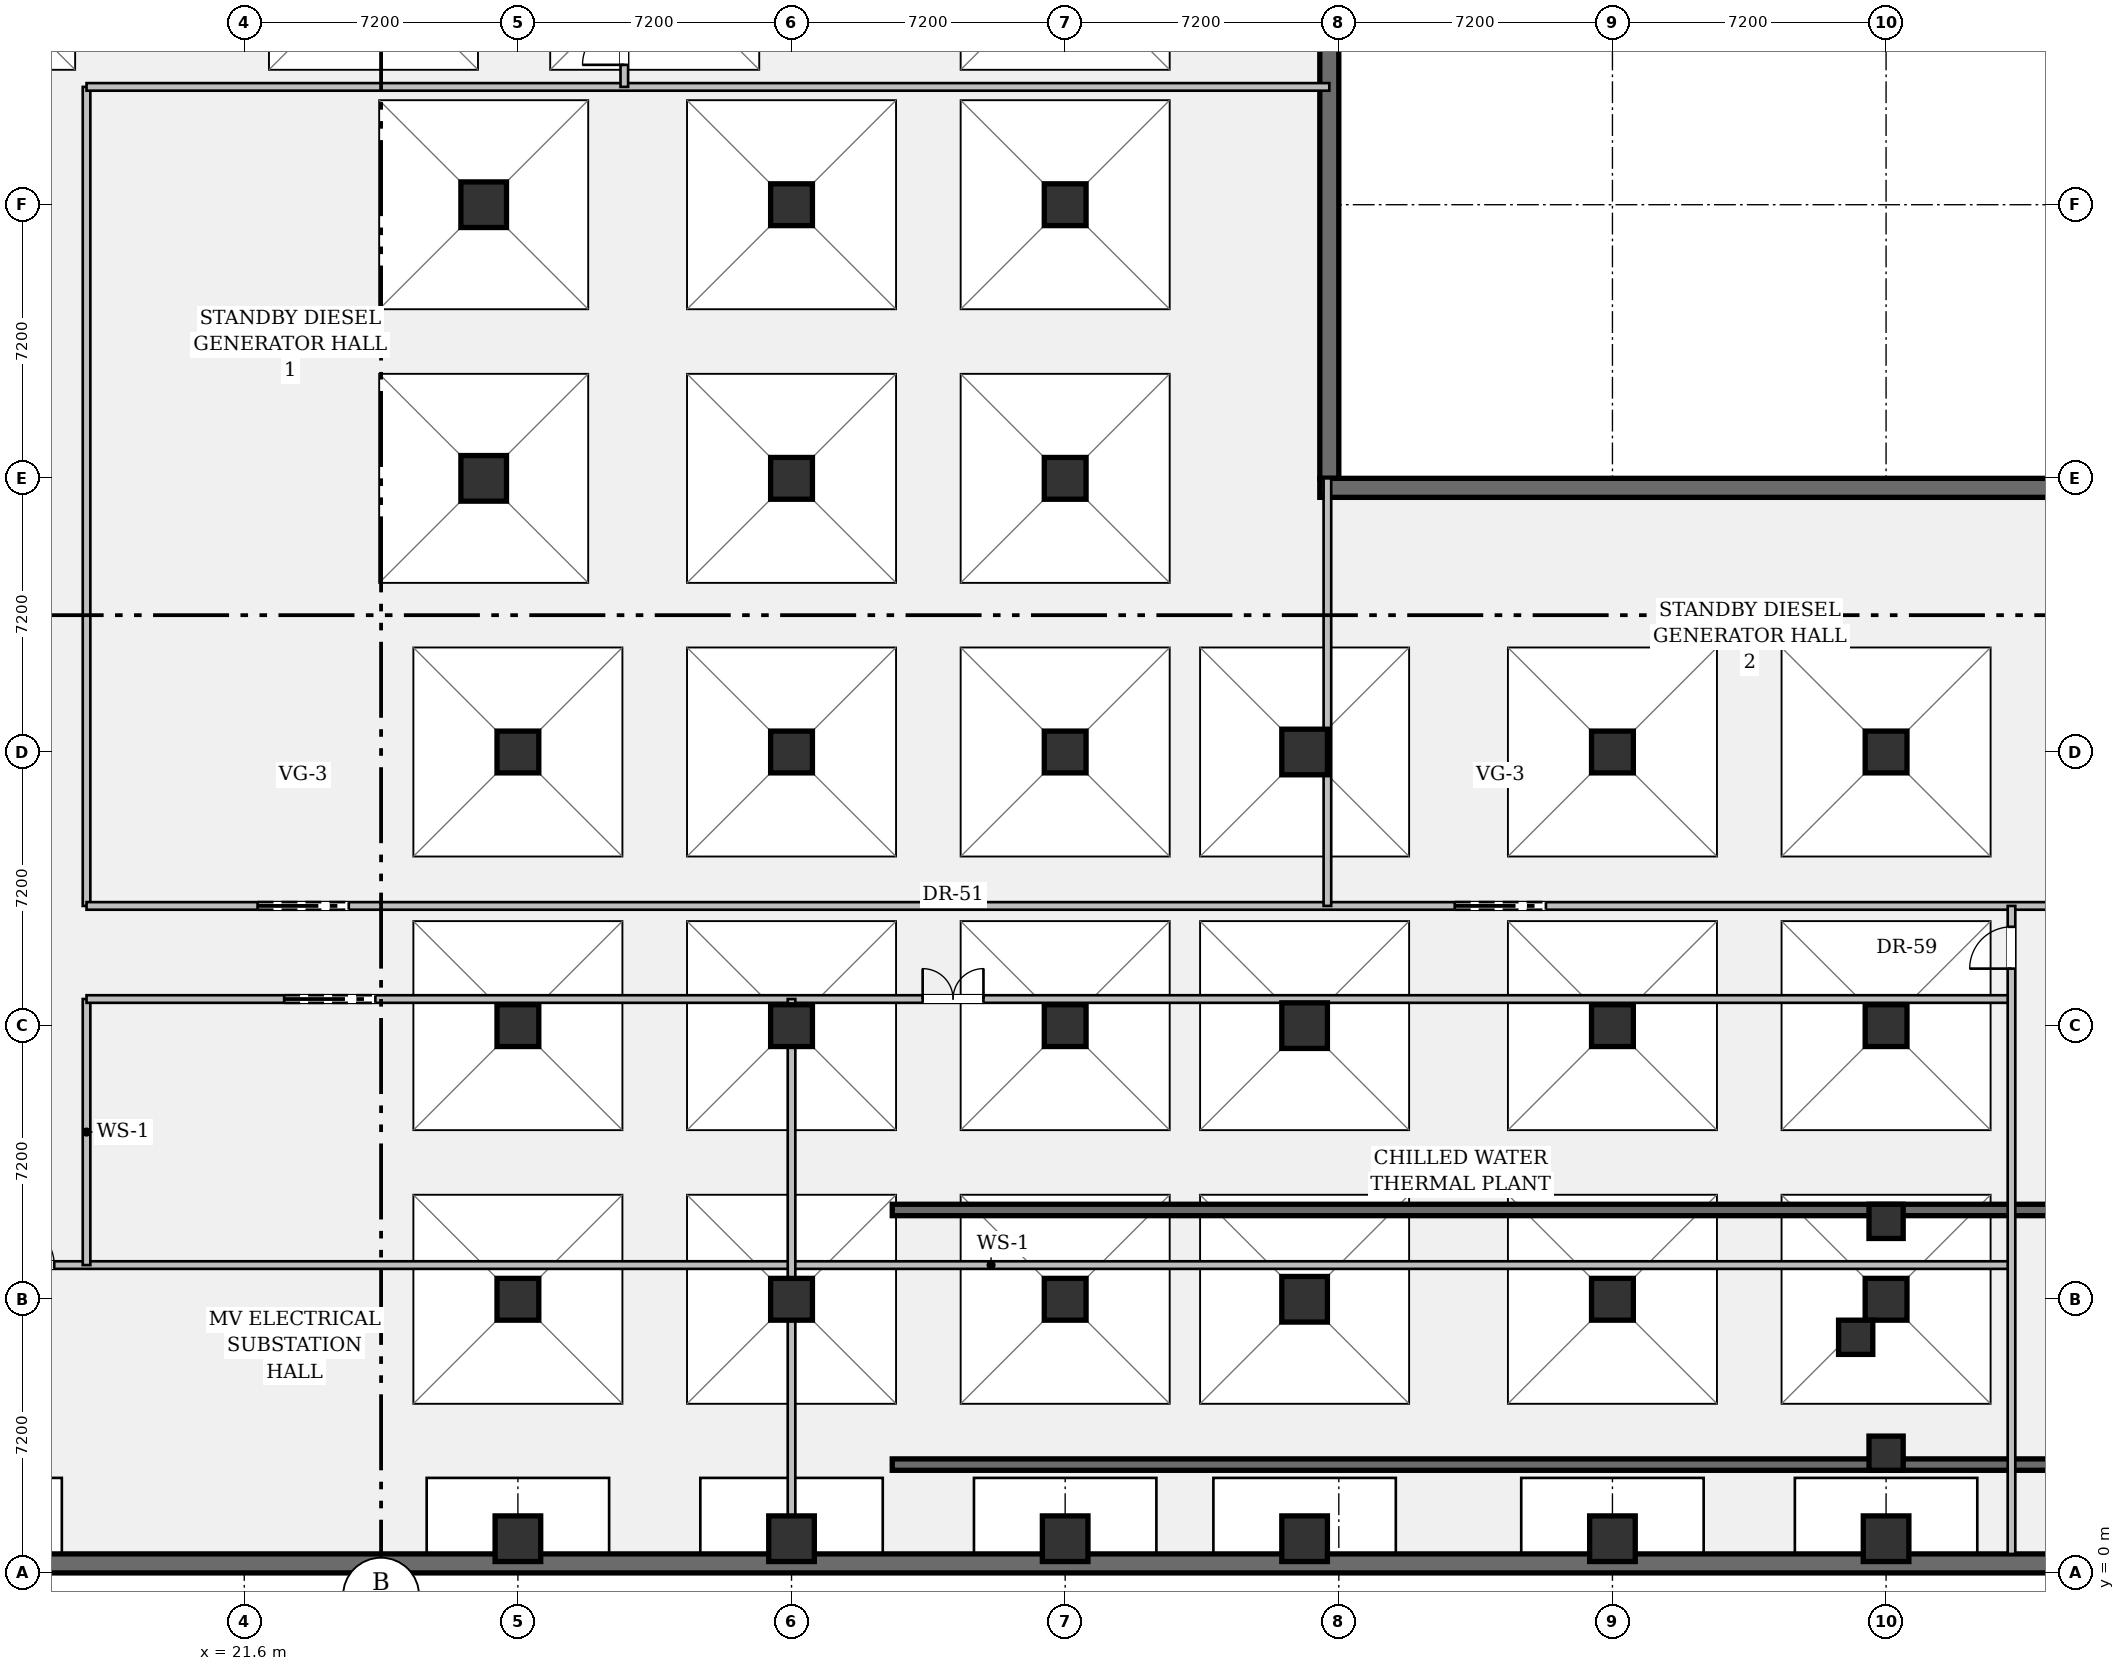
"""IFC4 building model, lengths in metres.
Left out: names, types, materials, properties, quantities, classifications, styles, units other than length and angle.
Written with IfcOpenShell. Run it as: python <this file> out.ifc"""

import sys

from ifc_helpers import new_model, si_unit, direction, frame, frame_2d, origin, origin_2d, place, context, subcontext, project, spatial, rectangle, hollow_rectangle, extrude, element, fill, save


model = new_model("IFC4")
c1 = context("Model", 3, precision=1e-05, world=origin(), true_north=direction((0.0, 1.0)))
c2 = subcontext(c1, "Body", "Model", "MODEL_VIEW")
j1 = project(units=[si_unit("LENGTHUNIT", "METRE"), si_unit("PLANEANGLEUNIT", "RADIAN")], contexts=[c1])
p1 = place(None, origin())
s1 = spatial("IfcSite", under=j1, at=p1, CompositionType="ELEMENT")
p2 = place(p1, origin())
s2 = spatial("IfcBuilding", under=s1, at=p2, CompositionType="ELEMENT")
p3 = place(p2, frame((0.0, 0.0, -9.1)))
s3 = spatial("IfcBuildingStorey", under=s2, at=p3, CompositionType="ELEMENT", Elevation=-9.1)
p4 = place(p3, frame((50.15, 47.2, 0.0), z_axis=(0.0, 0.0, 1.0), x_axis=(0.0, -1.0, 0.0)))
e1 = element("IfcWall", 1, at=p4, inside=s3, PredefinedType="SOLIDWALL", context=c2, shape_type="SweptSolid", body=[
    extrude(rectangle(XDim=18.4, YDim=0.5, at=frame_2d((9.2, 0.0))), origin(), (0.0, 0.0, 1.0), 4.25),
])
p5 = place(p3, frame((49.9, 28.55, 0.0), z_axis=(0.0, 0.0, 1.0), x_axis=(1.0, 0.0, 0.0)))
e2 = element("IfcWall", 2, at=p5, inside=s3, PredefinedType="SOLIDWALL", context=c2, shape_type="SweptSolid", body=[
    extrude(rectangle(XDim=33.8, YDim=0.5, at=frame_2d((16.9, 0.0))), origin(), (0.0, 0.0, 1.0), 4.25),
])
p6 = place(p3, frame((83.7, 0.25, 0.0), z_axis=(0.0, 0.0, 1.0), x_axis=(-1.0, 0.0, 0.0)))
e3 = element("IfcWall", 3, at=p6, inside=s3, PredefinedType="SOLIDWALL", context=c2, shape_type="SweptSolid", body=[
    extrude(rectangle(XDim=81.0, YDim=0.5, at=frame_2d((40.5, 0.0))), origin(), (0.0, 0.0, 1.0), 4.25),
])
for number, where, z_axis, x_axis in (
    (4, (27.9, 28.8, 0.0), (0.0, 0.0, 1.0), (1.0, 0.0, 0.0)),
    (5, (27.9, 36.0, 0.0), (0.0, 0.0, 1.0), (1.0, 0.0, 0.0)),
    (6, (28.8, 0.9, 0.0), (0.0, 0.0, 1.0), (1.0, 0.0, 0.0)),
):
    element("IfcColumn", number, at=place(p3, frame(where, z_axis=z_axis, x_axis=x_axis)), inside=s3, PredefinedType="COLUMN", context=c2, shape_type="SweptSolid", body=[
        extrude(hollow_rectangle(XDim=1.2, YDim=1.2, WallThickness=0.075, at=origin_2d()), origin(), (0.0, 0.0, 1.0), 4.25),
    ])
for number, where, z_axis, x_axis in (
    (7, (28.8, 7.2, 0.0), (0.0, 0.0, 1.0), (1.0, 0.0, 0.0)),
    (8, (28.8, 14.4, 0.0), (0.0, 0.0, 1.0), (1.0, 0.0, 0.0)),
    (9, (28.8, 21.6, 0.0), (0.0, 0.0, 1.0), (1.0, 0.0, 0.0)),
):
    element("IfcColumn", number, at=place(p3, frame(where, z_axis=z_axis, x_axis=x_axis)), inside=s3, PredefinedType="COLUMN", context=c2, shape_type="SweptSolid", body=[
        extrude(rectangle(XDim=1.1, YDim=1.1, at=origin_2d()), origin(), (0.0, 0.0, 1.0), 4.25),
    ])
p7 = place(p3, frame((36.0, 0.9, 0.0), z_axis=(0.0, 0.0, 1.0), x_axis=(1.0, 0.0, 0.0)))
e10 = element("IfcColumn", 10, at=p7, inside=s3, PredefinedType="COLUMN", context=c2, shape_type="SweptSolid", body=[
    extrude(hollow_rectangle(XDim=1.2, YDim=1.2, WallThickness=0.075, at=origin_2d()), origin(), (0.0, 0.0, 1.0), 4.25),
])
for number, where, z_axis, x_axis in (
    (11, (36.0, 7.2, 0.0), (0.0, 0.0, 1.0), (1.0, 0.0, 0.0)),
    (12, (36.0, 14.4, 0.0), (0.0, 0.0, 1.0), (1.0, 0.0, 0.0)),
    (13, (36.0, 21.6, 0.0), (0.0, 0.0, 1.0), (1.0, 0.0, 0.0)),
    (14, (36.0, 28.8, 0.0), (0.0, 0.0, 1.0), (1.0, 0.0, 0.0)),
    (15, (36.0, 36.0, 0.0), (0.0, 0.0, 1.0), (1.0, 0.0, 0.0)),
):
    element("IfcColumn", number, at=place(p3, frame(where, z_axis=z_axis, x_axis=x_axis)), inside=s3, PredefinedType="COLUMN", context=c2, shape_type="SweptSolid", body=[
        extrude(rectangle(XDim=1.1, YDim=1.1, at=origin_2d()), origin(), (0.0, 0.0, 1.0), 4.25),
    ])
p8 = place(p3, frame((43.2, 0.9, 0.0), z_axis=(0.0, 0.0, 1.0), x_axis=(1.0, 0.0, 0.0)))
e16 = element("IfcColumn", 16, at=p8, inside=s3, PredefinedType="COLUMN", context=c2, shape_type="SweptSolid", body=[
    extrude(hollow_rectangle(XDim=1.2, YDim=1.2, WallThickness=0.075, at=origin_2d()), origin(), (0.0, 0.0, 1.0), 4.25),
])
for number, where, z_axis, x_axis in (
    (17, (43.2, 7.2, 0.0), (0.0, 0.0, 1.0), (1.0, 0.0, 0.0)),
    (18, (43.2, 14.4, 0.0), (0.0, 0.0, 1.0), (1.0, 0.0, 0.0)),
    (19, (43.2, 21.6, 0.0), (0.0, 0.0, 1.0), (1.0, 0.0, 0.0)),
    (20, (43.2, 28.8, 0.0), (0.0, 0.0, 1.0), (1.0, 0.0, 0.0)),
    (21, (43.2, 36.0, 0.0), (0.0, 0.0, 1.0), (1.0, 0.0, 0.0)),
):
    element("IfcColumn", number, at=place(p3, frame(where, z_axis=z_axis, x_axis=x_axis)), inside=s3, PredefinedType="COLUMN", context=c2, shape_type="SweptSolid", body=[
        extrude(rectangle(XDim=1.1, YDim=1.1, at=origin_2d()), origin(), (0.0, 0.0, 1.0), 4.25),
    ])
for number, where, z_axis, x_axis in (
    (22, (49.5, 0.9, 0.0), (0.0, 0.0, 1.0), (1.0, 0.0, 0.0)),
    (23, (49.5, 7.2, 0.0), (0.0, 0.0, 1.0), (1.0, 0.0, 0.0)),
    (24, (49.5, 14.4, 0.0), (0.0, 0.0, 1.0), (1.0, 0.0, 0.0)),
    (25, (49.5, 21.6, 0.0), (0.0, 0.0, 1.0), (1.0, 0.0, 0.0)),
    (26, (57.6, 0.9, 0.0), (0.0, 0.0, 1.0), (1.0, 0.0, 0.0)),
):
    element("IfcColumn", number, at=place(p3, frame(where, z_axis=z_axis, x_axis=x_axis)), inside=s3, PredefinedType="COLUMN", context=c2, shape_type="SweptSolid", body=[
        extrude(hollow_rectangle(XDim=1.2, YDim=1.2, WallThickness=0.075, at=origin_2d()), origin(), (0.0, 0.0, 1.0), 4.25),
    ])
for number, where, z_axis, x_axis in (
    (27, (57.6, 7.2, 0.0), (0.0, 0.0, 1.0), (1.0, 0.0, 0.0)),
    (28, (57.6, 14.4, 0.0), (0.0, 0.0, 1.0), (1.0, 0.0, 0.0)),
    (29, (57.6, 21.6, 0.0), (0.0, 0.0, 1.0), (1.0, 0.0, 0.0)),
):
    element("IfcColumn", number, at=place(p3, frame(where, z_axis=z_axis, x_axis=x_axis)), inside=s3, PredefinedType="COLUMN", context=c2, shape_type="SweptSolid", body=[
        extrude(rectangle(XDim=1.1, YDim=1.1, at=origin_2d()), origin(), (0.0, 0.0, 1.0), 4.25),
    ])
p9 = place(p3, frame((64.8, 0.9, 0.0), z_axis=(0.0, 0.0, 1.0), x_axis=(1.0, 0.0, 0.0)))
e30 = element("IfcColumn", 30, at=p9, inside=s3, PredefinedType="COLUMN", context=c2, shape_type="SweptSolid", body=[
    extrude(hollow_rectangle(XDim=1.2, YDim=1.2, WallThickness=0.075, at=origin_2d()), origin(), (0.0, 0.0, 1.0), 4.25),
])
for number, where, z_axis, x_axis in (
    (31, (64.8, 7.2, 0.0), (0.0, 0.0, 1.0), (1.0, 0.0, 0.0)),
    (32, (64.8, 14.4, 0.0), (0.0, 0.0, 1.0), (1.0, 0.0, 0.0)),
    (33, (64.8, 21.6, 0.0), (0.0, 0.0, 1.0), (1.0, 0.0, 0.0)),
):
    element("IfcColumn", number, at=place(p3, frame(where, z_axis=z_axis, x_axis=x_axis)), inside=s3, PredefinedType="COLUMN", context=c2, shape_type="SweptSolid", body=[
        extrude(rectangle(XDim=1.1, YDim=1.1, at=origin_2d()), origin(), (0.0, 0.0, 1.0), 4.25),
    ])
p10 = place(p3, frame((38.65, 2.85, 0.0), z_axis=(0.0, 0.0, 1.0), x_axis=(1.0, 0.0, 0.0)))
e34 = element("IfcWall", 34, at=p10, inside=s3, PredefinedType="SHEAR", context=c2, shape_type="SweptSolid", body=[
    extrude(rectangle(XDim=44.85, YDim=0.3, at=frame_2d((22.425, 0.0))), origin(), (0.0, 0.0, 1.0), 4.25),
])
p11 = place(p3, frame((38.65, 9.55, 0.0), z_axis=(0.0, 0.0, 1.0), x_axis=(1.0, 0.0, 0.0)))
e35 = element("IfcWall", 35, at=p11, inside=s3, PredefinedType="SHEAR", context=c2, shape_type="SweptSolid", body=[
    extrude(rectangle(XDim=46.55, YDim=0.3, at=frame_2d((23.275, 0.0))), origin(), (0.0, 0.0, 1.0), 4.25),
])
for number, where, z_axis, x_axis in (
    (36, (64.8, 3.15, 0.0), (0.0, 0.0, 1.0), (1.0, 0.0, 0.0)),
    (37, (64.0, 6.2, 0.0), (0.0, 0.0, 1.0), (1.0, 0.0, 0.0)),
    (38, (64.8, 9.25, 0.0), (0.0, 0.0, 1.0), (1.0, 0.0, 0.0)),
):
    element("IfcColumn", number, at=place(p3, frame(where, z_axis=z_axis, x_axis=x_axis)), inside=s3, PredefinedType="COLUMN", context=c2, shape_type="SweptSolid", body=[
        extrude(rectangle(XDim=0.9, YDim=0.9, at=origin_2d()), origin(), (0.0, 0.0, 1.0), 4.25),
    ])
p12 = place(p3, frame((14.4, 8.1, 0.0), z_axis=(0.0, 0.0, 1.0), x_axis=(1.0, 0.0, 0.0)))
e39 = element("IfcWall", 39, at=p12, inside=s3, PredefinedType="PARTITIONING", context=c2, shape_type="SweptSolid", body=[
    extrude(rectangle(XDim=53.7, YDim=0.2, at=frame_2d((26.85, 0.0))), origin(), (0.0, 0.0, 1.0), 3.288),
])
p13 = place(p12, frame((1.1, 0.0, 0.0)))
e40 = element("IfcOpeningElement", 40, at=p13, cuts=e39, PredefinedType="OPENING", context=c2, shape_type="SweptSolid", body=[
    extrude(rectangle(XDim=1.1, YDim=2.15, at=frame_2d((0.55, 1.075))), frame((0.0, 0.112, 0.0), z_axis=(0.0, -1.0, 0.0), x_axis=(1.0, 0.0, 0.0)), (0.0, 0.0, 1.0), 0.224),
])
p14 = place(p3, frame((17.45, 8.1, 0.0), z_axis=(0.0, 0.0, 1.0), x_axis=(0.0, 1.0, 0.0)))
e41 = element("IfcWall", 41, at=p14, inside=s3, PredefinedType="PARTITIONING", context=c2, shape_type="SweptSolid", body=[
    extrude(rectangle(XDim=7.0, YDim=0.2, at=frame_2d((3.5, 0.0))), origin(), (0.0, 0.0, 1.0), 3.288),
])
p15 = place(p3, frame((17.45, 17.55, 0.0), z_axis=(0.0, 0.0, 1.0), x_axis=(0.0, 1.0, 0.0)))
e42 = element("IfcWall", 42, at=p15, inside=s3, PredefinedType="PARTITIONING", context=c2, shape_type="SweptSolid", body=[
    extrude(rectangle(XDim=21.55, YDim=0.2, at=frame_2d((10.775, 0.0))), origin(), (0.0, 0.0, 1.0), 3.288),
])
p16 = place(p3, frame((17.45, 39.1, 0.0), z_axis=(0.0, 0.0, 1.0), x_axis=(1.0, 0.0, 0.0)))
e43 = element("IfcWall", 43, at=p16, inside=s3, PredefinedType="PARTITIONING", context=c2, shape_type="SweptSolid", body=[
    extrude(rectangle(XDim=32.7, YDim=0.2, at=frame_2d((16.35, 0.0))), origin(), (0.0, 0.0, 1.0), 3.288),
])
p17 = place(p3, frame((31.6, 39.1, 0.0), z_axis=(0.0, 0.0, 1.0), x_axis=(0.0, 1.0, 0.0)))
e44 = element("IfcWall", 44, at=p17, inside=s3, PredefinedType="PARTITIONING", context=c2, shape_type="SweptSolid", body=[
    extrude(rectangle(XDim=10.9, YDim=0.2, at=frame_2d((5.45, 0.0))), origin(), (0.0, 0.0, 1.0), 3.288),
])
p18 = place(p17, frame((0.58, 0.0, 0.0)))
e45 = element("IfcOpeningElement", 45, at=p18, cuts=e44, PredefinedType="OPENING", context=c2, shape_type="SweptSolid", body=[
    extrude(rectangle(XDim=1.1, YDim=2.15, at=frame_2d((0.55, 1.075))), frame((0.0, 0.112, 0.0), z_axis=(0.0, -1.0, 0.0), x_axis=(1.0, 0.0, 0.0)), (0.0, 0.0, 1.0), 0.224),
])
p19 = place(p3, frame((17.45, 15.1, 0.0), z_axis=(0.0, 0.0, 1.0), x_axis=(1.0, 0.0, 0.0)))
e46 = element("IfcWall", 46, at=p19, inside=s3, PredefinedType="PARTITIONING", context=c2, shape_type="SweptSolid", body=[
    extrude(rectangle(XDim=50.65, YDim=0.2, at=frame_2d((25.325, 0.0))), origin(), (0.0, 0.0, 1.0), 3.288),
])
p20 = place(p19, frame((5.2, 0.0, 0.0)))
e47 = element("IfcOpeningElement", 47, at=p20, cuts=e46, PredefinedType="OPENING", context=c2, shape_type="SweptSolid", body=[
    extrude(rectangle(XDim=2.4, YDim=2.4, at=frame_2d((1.2, 1.2))), frame((0.0, 0.112, 0.0), z_axis=(0.0, -1.0, 0.0), x_axis=(1.0, 0.0, 0.0)), (0.0, 0.0, 1.0), 0.224),
])
p21 = place(p19, frame((22.0, 0.0, 0.0)))
e48 = element("IfcOpeningElement", 48, at=p21, cuts=e46, PredefinedType="OPENING", context=c2, shape_type="SweptSolid", body=[
    extrude(rectangle(XDim=1.6, YDim=2.2, at=frame_2d((0.8, 1.1))), frame((0.0, 0.112, 0.0), z_axis=(0.0, -1.0, 0.0), x_axis=(1.0, 0.0, 0.0)), (0.0, 0.0, 1.0), 0.224),
])
p22 = place(p3, frame((17.45, 17.55, 0.0), z_axis=(0.0, 0.0, 1.0), x_axis=(1.0, 0.0, 0.0)))
e49 = element("IfcWall", 49, at=p22, inside=s3, PredefinedType="PARTITIONING", context=c2, shape_type="SweptSolid", body=[
    extrude(rectangle(XDim=68.45, YDim=0.2, at=frame_2d((34.225, 0.0))), origin(), (0.0, 0.0, 1.0), 3.288),
])
p23 = place(p22, frame((4.5, 0.0, 0.0)))
e50 = element("IfcOpeningElement", 50, at=p23, cuts=e49, PredefinedType="OPENING", context=c2, shape_type="SweptSolid", body=[
    extrude(rectangle(XDim=2.4, YDim=2.4, at=frame_2d((1.2, 1.2))), frame((0.0, 0.112, 0.0), z_axis=(0.0, -1.0, 0.0), x_axis=(1.0, 0.0, 0.0)), (0.0, 0.0, 1.0), 0.224),
])
p24 = place(p22, frame((36.0, 0.0, 0.0)))
e51 = element("IfcOpeningElement", 51, at=p24, cuts=e49, PredefinedType="OPENING", context=c2, shape_type="SweptSolid", body=[
    extrude(rectangle(XDim=2.4, YDim=2.4, at=frame_2d((1.2, 1.2))), frame((0.0, 0.112, 0.0), z_axis=(0.0, -1.0, 0.0), x_axis=(1.0, 0.0, 0.0)), (0.0, 0.0, 1.0), 0.224),
])
p25 = place(p3, frame((68.1, 0.5, 0.0), z_axis=(0.0, 0.0, 1.0), x_axis=(0.0, 1.0, 0.0)))
e52 = element("IfcWall", 52, at=p25, inside=s3, PredefinedType="PARTITIONING", context=c2, shape_type="SweptSolid", body=[
    extrude(rectangle(XDim=17.05, YDim=0.2, at=frame_2d((8.525, 0.0))), origin(), (0.0, 0.0, 1.0), 3.288),
])
p26 = place(p25, frame((15.4, 0.0, 0.0)))
e53 = element("IfcOpeningElement", 53, at=p26, cuts=e52, PredefinedType="OPENING", context=c2, shape_type="SweptSolid", body=[
    extrude(rectangle(XDim=1.1, YDim=2.15, at=frame_2d((0.55, 1.075))), frame((0.0, 0.112, 0.0), z_axis=(0.0, -1.0, 0.0), x_axis=(1.0, 0.0, 0.0)), (0.0, 0.0, 1.0), 0.224),
])
p27 = place(p3, frame((50.1, 17.55, 0.0), z_axis=(0.0, 0.0, 1.0), x_axis=(0.0, 1.0, 0.0)))
e54 = element("IfcWall", 54, at=p27, inside=s3, PredefinedType="PARTITIONING", context=c2, shape_type="SweptSolid", body=[
    extrude(rectangle(XDim=11.25, YDim=0.2, at=frame_2d((5.625, 0.0))), origin(), (0.0, 0.0, 1.0), 3.288),
])
p28 = place(p3, frame((36.0, 0.5, 0.0), z_axis=(0.0, 0.0, 1.0), x_axis=(0.0, 1.0, 0.0)))
e55 = element("IfcWall", 55, at=p28, inside=s3, PredefinedType="PARTITIONING", context=c2, shape_type="SweptSolid", body=[
    extrude(rectangle(XDim=14.6, YDim=0.2, at=frame_2d((7.3, 0.0))), origin(), (0.0, 0.0, 1.0), 3.288),
])
p29 = place(p23, origin())
e56 = element("IfcDoor", 56, at=p29, inside=s3, OperationType="DOUBLE_DOOR_SINGLE_SWING", PredefinedType="GATE", context=c2, shape_type="SweptSolid", body=[
    extrude(rectangle(XDim=2.4, YDim=2.4, at=frame_2d((1.2, 1.2))), frame((0.0, 0.025, 0.0), z_axis=(0.0, -1.0, 0.0), x_axis=(1.0, 0.0, 0.0)), (0.0, 0.0, 1.0), 0.05),
])
fill(e50, e56)
p30 = place(p24, origin())
e57 = element("IfcDoor", 57, at=p30, inside=s3, OperationType="DOUBLE_DOOR_SINGLE_SWING", PredefinedType="GATE", context=c2, shape_type="SweptSolid", body=[
    extrude(rectangle(XDim=2.4, YDim=2.4, at=frame_2d((1.2, 1.2))), frame((0.0, 0.025, 0.0), z_axis=(0.0, -1.0, 0.0), x_axis=(1.0, 0.0, 0.0)), (0.0, 0.0, 1.0), 0.05),
])
fill(e51, e57)
p31 = place(p20, origin())
e58 = element("IfcDoor", 58, at=p31, inside=s3, OperationType="DOUBLE_DOOR_SINGLE_SWING", PredefinedType="GATE", context=c2, shape_type="SweptSolid", body=[
    extrude(rectangle(XDim=2.4, YDim=2.4, at=frame_2d((1.2, 1.2))), frame((0.0, 0.025, 0.0), z_axis=(0.0, -1.0, 0.0), x_axis=(1.0, 0.0, 0.0)), (0.0, 0.0, 1.0), 0.05),
])
fill(e47, e58)
p32 = place(p21, origin())
e59 = element("IfcDoor", 59, at=p32, inside=s3, OperationType="DOUBLE_DOOR_SINGLE_SWING", PredefinedType="DOOR", context=c2, shape_type="SweptSolid", body=[
    extrude(rectangle(XDim=1.6, YDim=2.2, at=frame_2d((0.8, 1.1))), frame((0.0, 0.025, 0.0), z_axis=(0.0, -1.0, 0.0), x_axis=(1.0, 0.0, 0.0)), (0.0, 0.0, 1.0), 0.05),
])
fill(e48, e59)
p33 = place(p26, origin())
e60 = element("IfcDoor", 60, at=p33, inside=s3, OperationType="SINGLE_SWING_LEFT", PredefinedType="DOOR", context=c2, shape_type="SweptSolid", body=[
    extrude(rectangle(XDim=1.1, YDim=2.15, at=frame_2d((0.55, 1.075))), frame((0.0, 0.025, 0.0), z_axis=(0.0, -1.0, 0.0), x_axis=(1.0, 0.0, 0.0)), (0.0, 0.0, 1.0), 0.05),
])
fill(e53, e60)
p34 = place(p18, origin())
e61 = element("IfcDoor", 61, at=p34, inside=s3, OperationType="SINGLE_SWING_LEFT", PredefinedType="DOOR", context=c2, shape_type="SweptSolid", body=[
    extrude(rectangle(XDim=1.1, YDim=2.15, at=frame_2d((0.55, 1.075))), frame((0.0, 0.025, 0.0), z_axis=(0.0, -1.0, 0.0), x_axis=(1.0, 0.0, 0.0)), (0.0, 0.0, 1.0), 0.05),
])
fill(e45, e61)
p35 = place(p13, origin())
e62 = element("IfcDoor", 62, at=p35, inside=s3, OperationType="SINGLE_SWING_LEFT", PredefinedType="DOOR", context=c2, shape_type="SweptSolid", body=[
    extrude(rectangle(XDim=1.1, YDim=2.15, at=frame_2d((0.55, 1.075))), frame((0.0, 0.025, 0.0), z_axis=(0.0, -1.0, 0.0), x_axis=(1.0, 0.0, 0.0)), (0.0, 0.0, 1.0), 0.05),
])
fill(e40, e62)
save(model, sys.argv[1])
